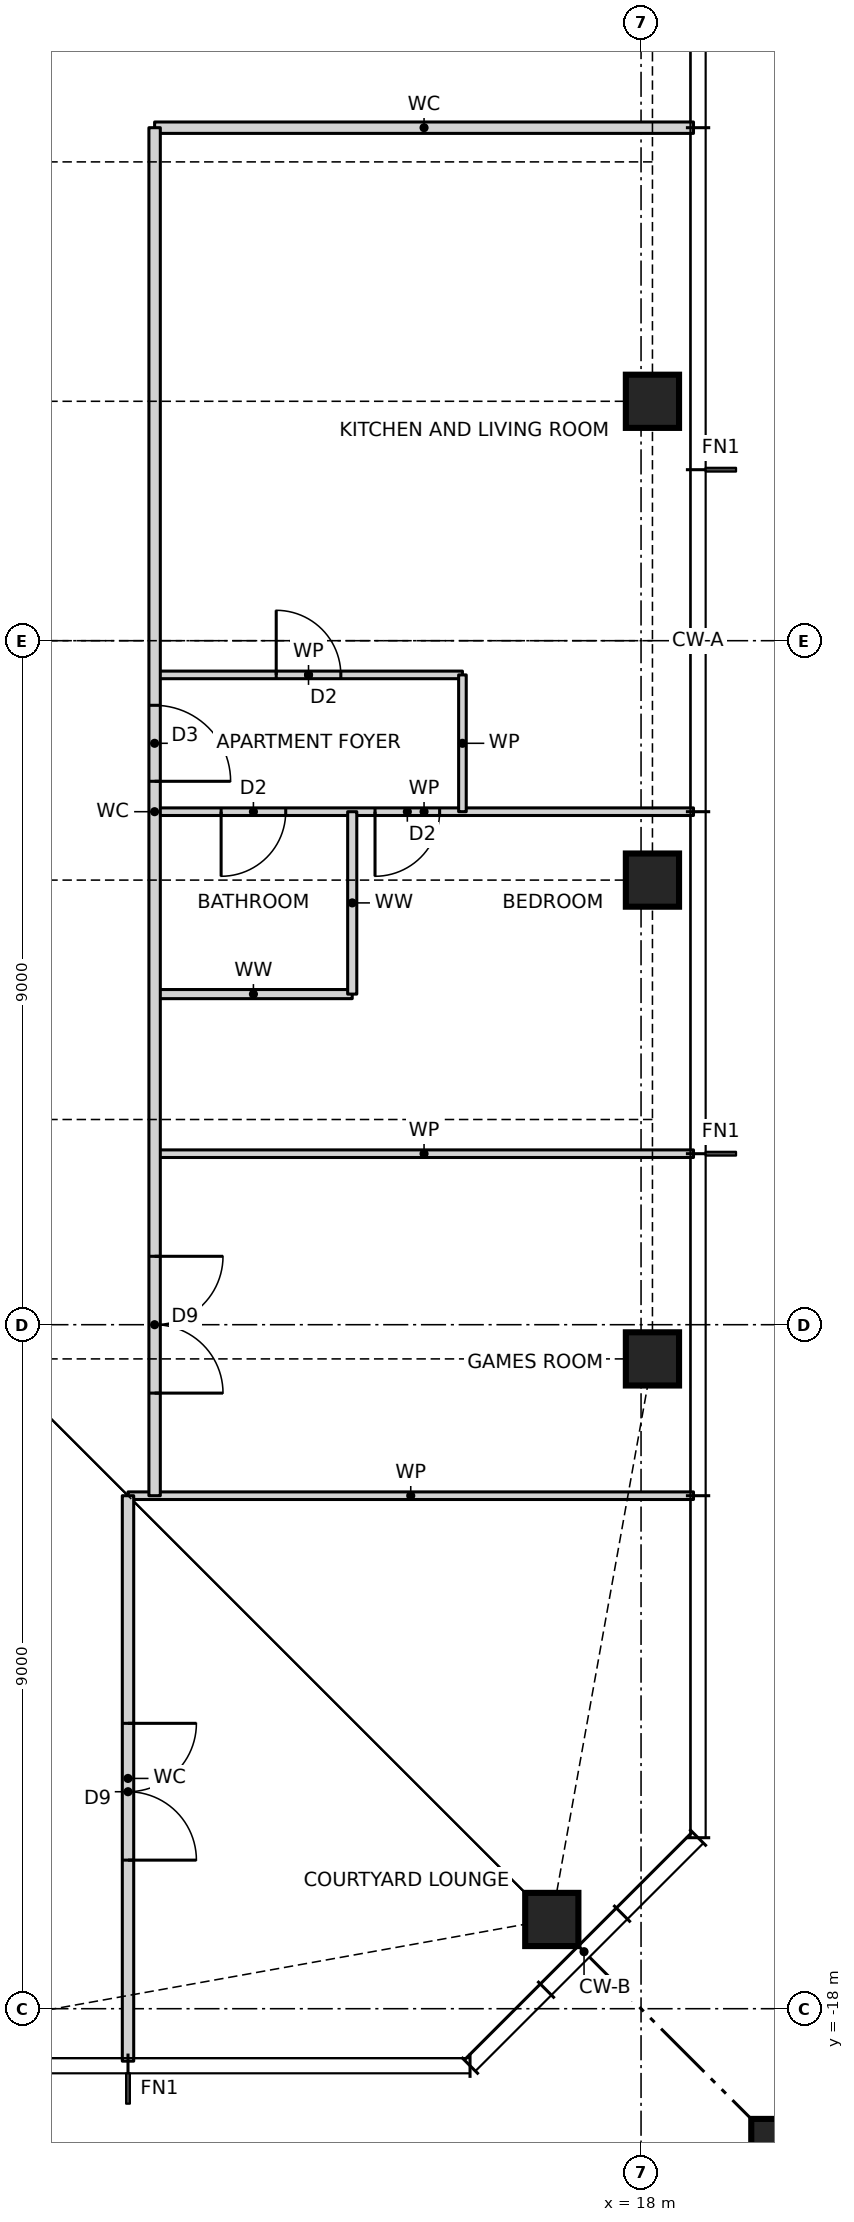
"""IFC4 building model, lengths in metres.
Left out: names, types, materials, properties, quantities, classifications, styles, units other than length and angle.
Written with IfcOpenShell. Run it as: python <this file> out.ifc"""

import sys

from ifc_helpers import new_model, si_unit, direction, frame, frame_2d, origin, origin_2d, place, context, subcontext, project, spatial, rectangle, hollow_rectangle, i_section, extrude, element, fill, save


model = new_model("IFC4")
c1 = context("Model", 3, precision=1e-05, world=origin(), true_north=direction((0.0, 1.0)))
c2 = subcontext(c1, "Body", "Model", "MODEL_VIEW")
j1 = project(units=[si_unit("LENGTHUNIT", "METRE"), si_unit("PLANEANGLEUNIT", "RADIAN")], contexts=[c1])
p1 = place(None, origin())
s1 = spatial("IfcSite", under=j1, at=p1, CompositionType="ELEMENT")
p2 = place(p1, origin())
s2 = spatial("IfcBuilding", under=s1, at=p2, CompositionType="ELEMENT")
p3 = place(p2, frame((0.0, 0.0, 191.5)))
s3 = spatial("IfcBuildingStorey", under=s2, at=p3, CompositionType="ELEMENT", Elevation=191.5)
for number, where, z_axis, x_axis in (
    (1, (16.826, -16.826, 0.0), (0.0, 0.0, 1.0), (1.0, 0.0, 0.0)),
    (2, (18.15, -9.45, 0.0), (0.0, 0.0, 1.0), (1.0, 0.0, 0.0)),
    (3, (18.15, -3.15, 0.0), (0.0, 0.0, 1.0), (1.0, 0.0, 0.0)),
    (4, (18.15, 3.15, 0.0), (0.0, 0.0, 1.0), (1.0, 0.0, 0.0)),
):
    element("IfcColumn", number, at=place(p3, frame(where, z_axis=z_axis, x_axis=x_axis)), inside=s3, PredefinedType="COLUMN", context=c2, shape_type="SweptSolid", body=[
        extrude(hollow_rectangle(XDim=0.7, YDim=0.7, WallThickness=0.06, at=origin_2d()), origin(), (0.0, 0.0, 1.0), 3.5),
    ])
p4 = place(p3, frame((21.65, -21.65, 0.0), z_axis=(0.0, 0.0, 1.0), x_axis=(1.0, 0.0, 0.0)))
e5 = element("IfcColumn", 5, at=p4, inside=s3, PredefinedType="COLUMN", context=c2, shape_type="SweptSolid", body=[
    extrude(rectangle(XDim=4.4, YDim=4.4, at=origin_2d()), origin(), (0.0, 0.0, 1.0), 3.5),
    extrude(i_section(OverallWidth=0.478, OverallDepth=0.599, WebThickness=0.1, FlangeThickness=0.14, at=origin_2d()), origin(), (0.0, 0.0, 1.0), 3.5),
])
p5 = place(p3, frame((11.25, -11.25, 0.0), z_axis=(0.0, 0.0, 1.0), x_axis=(1.0, 0.0, 0.0)))
e6 = element("IfcWall", 6, at=p5, inside=s3, PredefinedType="PARTITIONING", context=c2, shape_type="SweptSolid", body=[
    extrude(rectangle(XDim=7.44, YDim=0.1, at=frame_2d((3.72, 0.0))), origin(), (0.0, 0.0, 1.0), 3.27),
])
p6 = place(p3, frame((11.6, -6.75, 0.0), z_axis=(0.0, 0.0, 1.0), x_axis=(1.0, 0.0, 0.0)))
e7 = element("IfcWall", 7, at=p6, inside=s3, PredefinedType="PARTITIONING", context=c2, shape_type="SweptSolid", body=[
    extrude(rectangle(XDim=7.09, YDim=0.1, at=frame_2d((3.545, 0.0))), origin(), (0.0, 0.0, 1.0), 3.27),
])
p7 = place(p3, frame((11.6, -4.65, 0.0), z_axis=(0.0, 0.0, 1.0), x_axis=(1.0, 0.0, 0.0)))
e8 = element("IfcWall", 8, at=p7, inside=s3, PredefinedType="PARTITIONING", context=c2, shape_type="SweptSolid", body=[
    extrude(rectangle(XDim=2.6, YDim=0.12, at=frame_2d((1.3, 0.0))), origin(), (0.0, 0.0, 1.0), 3.27),
])
p8 = place(p3, frame((11.6, -2.25, 0.0), z_axis=(0.0, 0.0, 1.0), x_axis=(1.0, 0.0, 0.0)))
e9 = element("IfcWall", 9, at=p8, inside=s3, PredefinedType="PARTITIONING", context=c2, shape_type="SweptSolid", body=[
    extrude(rectangle(XDim=7.09, YDim=0.1, at=frame_2d((3.545, 0.0))), origin(), (0.0, 0.0, 1.0), 3.27),
])
p9 = place(p8, frame((2.9, 0.0, 0.0)))
e10 = element("IfcOpeningElement", 10, at=p9, cuts=e9, PredefinedType="OPENING", context=c2, shape_type="SweptSolid", body=[
    extrude(rectangle(XDim=0.85, YDim=2.1, at=frame_2d((0.425, 1.05))), frame((0.0, 0.06, 0.0), z_axis=(0.0, -1.0, 0.0), x_axis=(1.0, 0.0, 0.0)), (0.0, 0.0, 1.0), 0.12),
])
p10 = place(p8, frame((0.875, 0.0, 0.0)))
e11 = element("IfcOpeningElement", 11, at=p10, cuts=e9, PredefinedType="OPENING", context=c2, shape_type="SweptSolid", body=[
    extrude(rectangle(XDim=0.85, YDim=2.1, at=frame_2d((0.425, 1.05))), frame((0.0, 0.06, 0.0), z_axis=(0.0, -1.0, 0.0), x_axis=(1.0, 0.0, 0.0)), (0.0, 0.0, 1.0), 0.12),
])
p11 = place(p3, frame((11.6, -0.45, 0.0), z_axis=(0.0, 0.0, 1.0), x_axis=(1.0, 0.0, 0.0)))
e12 = element("IfcWall", 12, at=p11, inside=s3, PredefinedType="PARTITIONING", context=c2, shape_type="SweptSolid", body=[
    extrude(rectangle(XDim=4.05, YDim=0.1, at=frame_2d((2.025, 0.0))), origin(), (0.0, 0.0, 1.0), 3.27),
])
p12 = place(p11, frame((1.6, 0.0, 0.0)))
e13 = element("IfcOpeningElement", 13, at=p12, cuts=e12, PredefinedType="OPENING", context=c2, shape_type="SweptSolid", body=[
    extrude(rectangle(XDim=0.85, YDim=2.1, at=frame_2d((0.425, 1.05))), frame((0.0, 0.06, 0.0), z_axis=(0.0, -1.0, 0.0), x_axis=(1.0, 0.0, 0.0)), (0.0, 0.0, 1.0), 0.12),
])
p13 = place(p3, frame((11.6, 6.75, 0.0), z_axis=(0.0, 0.0, 1.0), x_axis=(1.0, 0.0, 0.0)))
e14 = element("IfcWall", 14, at=p13, inside=s3, PredefinedType="PARTITIONING", context=c2, shape_type="SweptSolid", body=[
    extrude(rectangle(XDim=7.09, YDim=0.15, at=frame_2d((3.545, 0.0))), origin(), (0.0, 0.0, 1.0), 3.27),
])
p14 = place(p3, frame((15.65, -2.25, 0.0), z_axis=(0.0, 0.0, 1.0), x_axis=(0.0, 1.0, 0.0)))
e15 = element("IfcWall", 15, at=p14, inside=s3, PredefinedType="PARTITIONING", context=c2, shape_type="SweptSolid", body=[
    extrude(rectangle(XDim=1.8, YDim=0.1, at=frame_2d((0.9, 0.0))), origin(), (0.0, 0.0, 1.0), 3.27),
])
p15 = place(p3, frame((14.2, -4.65, 0.0), z_axis=(0.0, 0.0, 1.0), x_axis=(0.0, 1.0, 0.0)))
e16 = element("IfcWall", 16, at=p15, inside=s3, PredefinedType="PARTITIONING", context=c2, shape_type="SweptSolid", body=[
    extrude(rectangle(XDim=2.4, YDim=0.12, at=frame_2d((1.2, 0.0))), origin(), (0.0, 0.0, 1.0), 3.27),
])
p16 = place(p3, frame((11.6, -11.25, 0.0), z_axis=(0.0, 0.0, 1.0), x_axis=(0.0, 1.0, 0.0)))
e17 = element("IfcWall", 17, at=p16, inside=s3, PredefinedType="PARTITIONING", context=c2, shape_type="SweptSolid", body=[
    extrude(rectangle(XDim=18.0, YDim=0.15, at=frame_2d((9.0, 0.0))), origin(), (0.0, 0.0, 1.0), 3.27),
])
p17 = place(p16, frame((1.35, 0.0, 0.0)))
e18 = element("IfcOpeningElement", 18, at=p17, cuts=e17, PredefinedType="OPENING", context=c2, shape_type="SweptSolid", body=[
    extrude(rectangle(XDim=1.8, YDim=2.1, at=frame_2d((0.9, 1.05))), frame((0.0, 0.085, 0.0), z_axis=(0.0, -1.0, 0.0), x_axis=(1.0, 0.0, 0.0)), (0.0, 0.0, 1.0), 0.17),
])
p18 = place(p16, frame((9.4, 0.0, 0.0)))
e19 = element("IfcOpeningElement", 19, at=p18, cuts=e17, PredefinedType="OPENING", context=c2, shape_type="SweptSolid", body=[
    extrude(rectangle(XDim=1.0, YDim=2.1, at=frame_2d((0.5, 1.05))), frame((0.0, 0.085, 0.0), z_axis=(0.0, -1.0, 0.0), x_axis=(1.0, 0.0, 0.0)), (0.0, 0.0, 1.0), 0.17),
])
p19 = place(p3, frame((11.25, -18.69, 0.0), z_axis=(0.0, 0.0, 1.0), x_axis=(0.0, 1.0, 0.0)))
e20 = element("IfcWall", 20, at=p19, inside=s3, PredefinedType="PARTITIONING", context=c2, shape_type="SweptSolid", body=[
    extrude(rectangle(XDim=7.44, YDim=0.15, at=frame_2d((3.72, 0.0))), origin(), (0.0, 0.0, 1.0), 3.27),
])
p20 = place(p19, frame((2.645, 0.0, 0.0)))
e21 = element("IfcOpeningElement", 21, at=p20, cuts=e20, PredefinedType="OPENING", context=c2, shape_type="SweptSolid", body=[
    extrude(rectangle(XDim=1.8, YDim=2.1, at=frame_2d((0.9, 1.05))), frame((0.0, 0.085, 0.0), z_axis=(0.0, -1.0, 0.0), x_axis=(1.0, 0.0, 0.0)), (0.0, 0.0, 1.0), 0.17),
])
p21 = place(p17, frame((1.8, 0.0, 0.0), z_axis=(0.0, 0.0, 1.0), x_axis=(-1.0, 0.0, 0.0)))
e22 = element("IfcDoor", 22, at=p21, inside=s3, OperationType="DOUBLE_DOOR_SINGLE_SWING", PredefinedType="DOOR", context=c2, shape_type="SweptSolid", body=[
    extrude(rectangle(XDim=1.8, YDim=2.1, at=frame_2d((0.9, 1.05))), frame((0.0, 0.025, 0.0), z_axis=(0.0, -1.0, 0.0), x_axis=(1.0, 0.0, 0.0)), (0.0, 0.0, 1.0), 0.05),
])
fill(e18, e22)
p22 = place(p18, frame((1.0, 0.0, 0.0), z_axis=(0.0, 0.0, 1.0), x_axis=(-1.0, 0.0, 0.0)))
e23 = element("IfcDoor", 23, at=p22, inside=s3, OperationType="SINGLE_SWING_RIGHT", PredefinedType="DOOR", context=c2, shape_type="SweptSolid", body=[
    extrude(rectangle(XDim=1.0, YDim=2.1, at=frame_2d((0.5, 1.05))), frame((0.0, 0.025, 0.0), z_axis=(0.0, -1.0, 0.0), x_axis=(1.0, 0.0, 0.0)), (0.0, 0.0, 1.0), 0.05),
])
fill(e19, e23)
p23 = place(p12, origin())
e24 = element("IfcDoor", 24, at=p23, inside=s3, OperationType="SINGLE_SWING_LEFT", PredefinedType="DOOR", context=c2, shape_type="SweptSolid", body=[
    extrude(rectangle(XDim=0.85, YDim=2.1, at=frame_2d((0.425, 1.05))), frame((0.0, 0.025, 0.0), z_axis=(0.0, -1.0, 0.0), x_axis=(1.0, 0.0, 0.0)), (0.0, 0.0, 1.0), 0.05),
])
fill(e13, e24)
p24 = place(p9, frame((0.85, 0.0, 0.0), z_axis=(0.0, 0.0, 1.0), x_axis=(-1.0, 0.0, 0.0)))
e25 = element("IfcDoor", 25, at=p24, inside=s3, OperationType="SINGLE_SWING_RIGHT", PredefinedType="DOOR", context=c2, shape_type="SweptSolid", body=[
    extrude(rectangle(XDim=0.85, YDim=2.1, at=frame_2d((0.425, 1.05))), frame((0.0, 0.025, 0.0), z_axis=(0.0, -1.0, 0.0), x_axis=(1.0, 0.0, 0.0)), (0.0, 0.0, 1.0), 0.05),
])
fill(e10, e25)
p25 = place(p10, frame((0.85, 0.0, 0.0), z_axis=(0.0, 0.0, 1.0), x_axis=(-1.0, 0.0, 0.0)))
e26 = element("IfcDoor", 26, at=p25, inside=s3, OperationType="SINGLE_SWING_RIGHT", PredefinedType="DOOR", context=c2, shape_type="SweptSolid", body=[
    extrude(rectangle(XDim=0.85, YDim=2.1, at=frame_2d((0.425, 1.05))), frame((0.0, 0.025, 0.0), z_axis=(0.0, -1.0, 0.0), x_axis=(1.0, 0.0, 0.0)), (0.0, 0.0, 1.0), 0.05),
])
fill(e11, e26)
p26 = place(p20, frame((1.8, 0.0, 0.0), z_axis=(0.0, 0.0, 1.0), x_axis=(-1.0, 0.0, 0.0)))
e27 = element("IfcDoor", 27, at=p26, inside=s3, OperationType="DOUBLE_DOOR_SINGLE_SWING", PredefinedType="DOOR", context=c2, shape_type="SweptSolid", body=[
    extrude(rectangle(XDim=1.8, YDim=2.1, at=frame_2d((0.9, 1.05))), frame((0.0, 0.025, 0.0), z_axis=(0.0, -1.0, 0.0), x_axis=(1.0, 0.0, 0.0)), (0.0, 0.0, 1.0), 0.05),
])
fill(e21, e27)
save(model, sys.argv[1])
